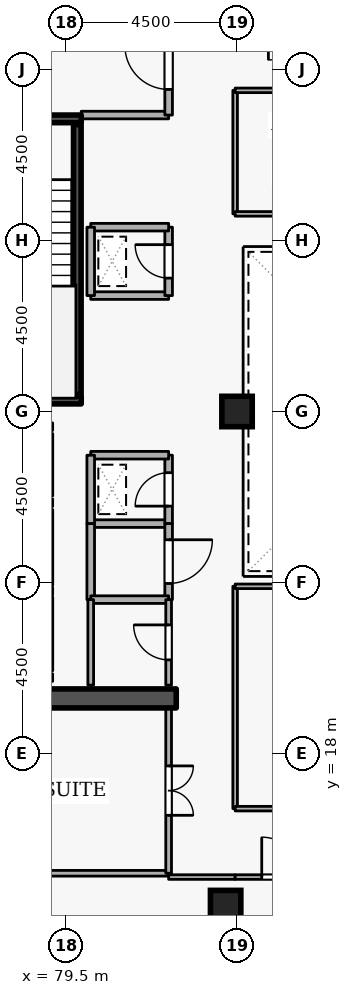
"""IFC4 building model, lengths in metres.
Left out: names, types, materials, properties, quantities, classifications, styles, units other than length and angle.
Written with IfcOpenShell. Run it as: python <this file> out.ifc"""

import sys

from ifc_helpers import new_model, si_unit, direction, frame, frame_2d, origin, origin_2d, place, context, subcontext, project, spatial, rectangle, extrude, element, fill, save


model = new_model("IFC4")
c1 = context("Model", 3, precision=1e-05, world=origin(), true_north=direction((0.0, 1.0)))
c2 = subcontext(c1, "Body", "Model", "MODEL_VIEW")
j1 = project(units=[si_unit("LENGTHUNIT", "METRE"), si_unit("PLANEANGLEUNIT", "RADIAN")], contexts=[c1])
p1 = place(None, origin())
s1 = spatial("IfcSite", under=j1, at=p1, CompositionType="ELEMENT")
p2 = place(p1, origin())
s2 = spatial("IfcBuilding", under=s1, at=p2, CompositionType="ELEMENT")
p3 = place(p2, frame((0.0, 0.0, 258.3)))
s3 = spatial("IfcBuildingStorey", under=s2, at=p3, CompositionType="ELEMENT", Elevation=258.3)
p4 = place(p3, frame((76.6, 19.45, 0.0), z_axis=(0.0, 0.0, 1.0), x_axis=(1.0, 0.0, 0.0)))
e1 = element("IfcWall", 1, at=p4, inside=s3, PredefinedType="SHEAR", context=c2, shape_type="SweptSolid", body=[
    extrude(rectangle(XDim=5.8, YDim=0.5, at=frame_2d((2.9, 0.0))), origin(), (0.0, 0.0, 1.0), 3.6),
])
for number, where, z_axis, x_axis in (
    (2, (83.7, 14.0, 0.0), (0.0, 0.0, 1.0), (1.0, 0.0, 0.0)),
    (3, (84.0, 27.0, 0.0), (0.0, 0.0, 1.0), (1.0, 0.0, 0.0)),
):
    element("IfcColumn", number, at=place(p3, frame(where, z_axis=z_axis, x_axis=x_axis)), inside=s3, PredefinedType="COLUMN", context=c2, shape_type="SweptSolid", body=[
        extrude(rectangle(XDim=0.8, YDim=0.8, at=origin_2d()), origin(), (0.0, 0.0, 1.0), 3.6),
    ])
p5 = place(p3, frame((79.05, 24.78, 0.0), z_axis=(0.0, 0.0, 1.0), x_axis=(0.0, 1.0, 0.0)))
e4 = element("IfcWall", 4, at=p5, inside=s3, PredefinedType="STANDARD", context=c2, shape_type="SweptSolid", body=[
    extrude(rectangle(XDim=1.64, YDim=0.2, at=frame_2d((0.82, 0.0))), origin(), (0.0, 0.0, 1.0), 3.34),
])
p6 = place(p5, frame((0.31, 0.0, 0.0)))
e5 = element("IfcOpeningElement", 5, at=p6, cuts=e4, PredefinedType="OPENING", context=c2, shape_type="SweptSolid", body=[
    extrude(rectangle(XDim=1.02, YDim=2.06, at=frame_2d((0.51, 1.03))), frame((0.0, 0.11, 0.0), z_axis=(0.0, -1.0, 0.0), x_axis=(1.0, 0.0, 0.0)), (0.0, 0.0, 1.0), 0.22),
])
p7 = place(p3, frame((79.05, 22.43, 0.0), z_axis=(0.0, 0.0, 1.0), x_axis=(0.0, 1.0, 0.0)))
e6 = element("IfcWall", 6, at=p7, inside=s3, PredefinedType="STANDARD", context=c2, shape_type="SweptSolid", body=[
    extrude(rectangle(XDim=1.99, YDim=0.2, at=frame_2d((0.995, 0.0))), origin(), (0.0, 0.0, 1.0), 3.34),
])
p8 = place(p7, frame((0.485, 0.0, 0.0)))
e7 = element("IfcOpeningElement", 7, at=p8, cuts=e6, PredefinedType="OPENING", context=c2, shape_type="SweptSolid", body=[
    extrude(rectangle(XDim=1.02, YDim=2.06, at=frame_2d((0.51, 1.03))), frame((0.0, 0.11, 0.0), z_axis=(0.0, -1.0, 0.0), x_axis=(1.0, 0.0, 0.0)), (0.0, 0.0, 1.0), 0.22),
])
p9 = place(p3, frame((79.05, 20.18, 0.0), z_axis=(0.0, 0.0, 1.0), x_axis=(0.0, 1.0, 0.0)))
e8 = element("IfcWall", 8, at=p9, inside=s3, PredefinedType="STANDARD", context=c2, shape_type="SweptSolid", body=[
    extrude(rectangle(XDim=1.94, YDim=0.2, at=frame_2d((0.97, 0.0))), origin(), (0.0, 0.0, 1.0), 3.34),
])
p10 = place(p9, frame((0.46, 0.0, 0.0)))
e9 = element("IfcOpeningElement", 9, at=p10, cuts=e8, PredefinedType="OPENING", context=c2, shape_type="SweptSolid", body=[
    extrude(rectangle(XDim=1.02, YDim=2.06, at=frame_2d((0.51, 1.03))), frame((0.0, 0.11, 0.0), z_axis=(0.0, -1.0, 0.0), x_axis=(1.0, 0.0, 0.0)), (0.0, 0.0, 1.0), 0.22),
])
p11 = place(p3, frame((76.55, 34.7, 0.0), z_axis=(0.0, 0.0, 1.0), x_axis=(1.0, 0.0, 0.0)))
e10 = element("IfcWall", 10, at=p11, inside=s3, PredefinedType="SHEAR", context=c2, shape_type="SweptSolid", body=[
    extrude(rectangle(XDim=3.35, YDim=0.2, at=frame_2d((1.675, 0.0))), origin(), (0.0, 0.0, 1.0), 3.6),
])
p12 = place(p11, frame((1.125, 0.0, 0.0)))
e11 = element("IfcOpeningElement", 11, at=p12, cuts=e10, PredefinedType="OPENING", context=c2, shape_type="SweptSolid", body=[
    extrude(rectangle(XDim=1.1, YDim=2.1, at=frame_2d((0.55, 1.05))), frame((0.0, 0.11, 0.0), z_axis=(0.0, -1.0, 0.0), x_axis=(1.0, 0.0, 0.0)), (0.0, 0.0, 1.0), 0.22),
])
p13 = place(p3, frame((79.9, 27.3, 0.0), z_axis=(0.0, 0.0, 1.0), x_axis=(-1.0, 0.0, 0.0)))
e12 = element("IfcWall", 12, at=p13, inside=s3, PredefinedType="SHEAR", context=c2, shape_type="SweptSolid", body=[
    extrude(rectangle(XDim=3.35, YDim=0.2, at=frame_2d((1.675, 0.0))), origin(), (0.0, 0.0, 1.0), 3.6),
])
p14 = place(p3, frame((79.797, 27.45, 0.0), z_axis=(0.0, 0.0, 1.0), x_axis=(0.0, 1.0, 0.0)))
e13 = element("IfcWall", 13, at=p14, inside=s3, PredefinedType="SHEAR", context=c2, shape_type="SweptSolid", body=[
    extrude(rectangle(XDim=7.1, YDim=0.2, at=frame_2d((3.55, 0.0))), origin(), (0.0, 0.0, 1.0), 3.6),
])
p15 = place(p3, frame((79.9, 34.8, 0.0), z_axis=(0.0, 0.0, 1.0), x_axis=(1.0, 0.0, 0.0)))
e14 = element("IfcWall", 14, at=p15, inside=s3, PredefinedType="STANDARD", context=c2, shape_type="SweptSolid", body=[
    extrude(rectangle(XDim=2.3, YDim=0.2, at=frame_2d((1.15, 0.0))), origin(), (0.0, 0.0, 1.0), 2.545),
])
p16 = place(p3, frame((82.2, 34.8, 0.0), z_axis=(0.0, 0.0, 1.0), x_axis=(0.0, 1.0, 0.0)))
e15 = element("IfcWall", 15, at=p16, inside=s3, PredefinedType="STANDARD", context=c2, shape_type="SweptSolid", body=[
    extrude(rectangle(XDim=2.5, YDim=0.2, at=frame_2d((1.25, 0.0))), origin(), (0.0, 0.0, 1.0), 3.34),
])
p17 = place(p16, frame((0.675, 0.0, 0.0)))
e16 = element("IfcOpeningElement", 16, at=p17, cuts=e15, PredefinedType="OPENING", context=c2, shape_type="SweptSolid", body=[
    extrude(rectangle(XDim=1.15, YDim=2.1, at=frame_2d((0.575, 1.05))), frame((0.0, 0.11, 0.0), z_axis=(0.0, -1.0, 0.0), x_axis=(1.0, 0.0, 0.0)), (0.0, 0.0, 1.0), 0.22),
])
p18 = place(p3, frame((80.15, 24.05, 0.0), z_axis=(0.0, 0.0, 1.0), x_axis=(1.0, 0.0, 0.0)))
e17 = element("IfcWall", 17, at=p18, inside=s3, PredefinedType="STANDARD", context=c2, shape_type="SweptSolid", body=[
    extrude(rectangle(XDim=2.05, YDim=0.2, at=frame_2d((1.025, 0.0))), origin(), (0.0, 0.0, 1.0), 3.34),
])
p19 = place(p3, frame((82.2, 24.05, 0.0), z_axis=(0.0, 0.0, 1.0), x_axis=(0.0, 1.0, 0.0)))
e18 = element("IfcWall", 18, at=p19, inside=s3, PredefinedType="STANDARD", context=c2, shape_type="SweptSolid", body=[
    extrude(rectangle(XDim=1.8, YDim=0.2, at=frame_2d((0.9, 0.0))), origin(), (0.0, 0.0, 1.0), 3.34),
])
p20 = place(p19, frame((0.46, 0.0, 0.0)))
e19 = element("IfcOpeningElement", 19, at=p20, cuts=e18, PredefinedType="OPENING", context=c2, shape_type="SweptSolid", body=[
    extrude(rectangle(XDim=0.88, YDim=2.04, at=frame_2d((0.44, 1.02))), frame((0.0, 0.11, 0.0), z_axis=(0.0, -1.0, 0.0), x_axis=(1.0, 0.0, 0.0)), (0.0, 0.0, 1.0), 0.22),
])
p21 = place(p3, frame((82.2, 25.85, 0.0), z_axis=(0.0, 0.0, 1.0), x_axis=(-1.0, 0.0, 0.0)))
e20 = element("IfcWall", 20, at=p21, inside=s3, PredefinedType="STANDARD", context=c2, shape_type="SweptSolid", body=[
    extrude(rectangle(XDim=2.05, YDim=0.2, at=frame_2d((1.025, 0.0))), origin(), (0.0, 0.0, 1.0), 3.34),
])
p22 = place(p3, frame((80.15, 25.85, 0.0), z_axis=(0.0, 0.0, 1.0), x_axis=(0.0, -1.0, 0.0)))
e21 = element("IfcWall", 21, at=p22, inside=s3, PredefinedType="STANDARD", context=c2, shape_type="SweptSolid", body=[
    extrude(rectangle(XDim=1.8, YDim=0.2, at=frame_2d((0.9, 0.0))), origin(), (0.0, 0.0, 1.0), 3.34),
])
p23 = place(p3, frame((80.15, 30.05, 0.0), z_axis=(0.0, 0.0, 1.0), x_axis=(1.0, 0.0, 0.0)))
e22 = element("IfcWall", 22, at=p23, inside=s3, PredefinedType="STANDARD", context=c2, shape_type="SweptSolid", body=[
    extrude(rectangle(XDim=2.05, YDim=0.2, at=frame_2d((1.025, 0.0))), origin(), (0.0, 0.0, 1.0), 3.34),
])
p24 = place(p3, frame((82.2, 30.05, 0.0), z_axis=(0.0, 0.0, 1.0), x_axis=(0.0, 1.0, 0.0)))
e23 = element("IfcWall", 23, at=p24, inside=s3, PredefinedType="STANDARD", context=c2, shape_type="SweptSolid", body=[
    extrude(rectangle(XDim=1.8, YDim=0.2, at=frame_2d((0.9, 0.0))), origin(), (0.0, 0.0, 1.0), 3.34),
])
p25 = place(p24, frame((0.46, 0.0, 0.0)))
e24 = element("IfcOpeningElement", 24, at=p25, cuts=e23, PredefinedType="OPENING", context=c2, shape_type="SweptSolid", body=[
    extrude(rectangle(XDim=0.88, YDim=2.04, at=frame_2d((0.44, 1.02))), frame((0.0, 0.11, 0.0), z_axis=(0.0, -1.0, 0.0), x_axis=(1.0, 0.0, 0.0)), (0.0, 0.0, 1.0), 0.22),
])
p26 = place(p3, frame((82.2, 31.85, 0.0), z_axis=(0.0, 0.0, 1.0), x_axis=(-1.0, 0.0, 0.0)))
e25 = element("IfcWall", 25, at=p26, inside=s3, PredefinedType="STANDARD", context=c2, shape_type="SweptSolid", body=[
    extrude(rectangle(XDim=2.05, YDim=0.2, at=frame_2d((1.025, 0.0))), origin(), (0.0, 0.0, 1.0), 3.34),
])
p27 = place(p3, frame((80.15, 31.85, 0.0), z_axis=(0.0, 0.0, 1.0), x_axis=(0.0, -1.0, 0.0)))
e26 = element("IfcWall", 26, at=p27, inside=s3, PredefinedType="STANDARD", context=c2, shape_type="SweptSolid", body=[
    extrude(rectangle(XDim=1.8, YDim=0.2, at=frame_2d((0.9, 0.0))), origin(), (0.0, 0.0, 1.0), 3.34),
])
p28 = place(p3, frame((80.15, 22.05, 0.0), z_axis=(0.0, 0.0, 1.0), x_axis=(0.0, 1.0, 0.0)))
e27 = element("IfcWall", 27, at=p28, inside=s3, PredefinedType="STANDARD", context=c2, shape_type="SweptSolid", body=[
    extrude(rectangle(XDim=2.0, YDim=0.2, at=frame_2d((1.0, 0.0))), origin(), (0.0, 0.0, 1.0), 3.34),
])
p29 = place(p3, frame((82.2, 24.05, 0.0), z_axis=(0.0, 0.0, 1.0), x_axis=(0.0, -1.0, 0.0)))
e28 = element("IfcWall", 28, at=p29, inside=s3, PredefinedType="STANDARD", context=c2, shape_type="SweptSolid", body=[
    extrude(rectangle(XDim=2.0, YDim=0.2, at=frame_2d((1.0, 0.0))), origin(), (0.0, 0.0, 1.0), 3.34),
])
p30 = place(p29, frame((0.425, 0.0, 0.0)))
e29 = element("IfcOpeningElement", 29, at=p30, cuts=e28, PredefinedType="OPENING", context=c2, shape_type="SweptSolid", body=[
    extrude(rectangle(XDim=1.15, YDim=2.1, at=frame_2d((0.575, 1.05))), frame((0.0, 0.11, 0.0), z_axis=(0.0, -1.0, 0.0), x_axis=(1.0, 0.0, 0.0)), (0.0, 0.0, 1.0), 0.22),
])
p31 = place(p3, frame((82.2, 22.05, 0.0), z_axis=(0.0, 0.0, 1.0), x_axis=(-1.0, 0.0, 0.0)))
e30 = element("IfcWall", 30, at=p31, inside=s3, PredefinedType="STANDARD", context=c2, shape_type="SweptSolid", body=[
    extrude(rectangle(XDim=2.05, YDim=0.2, at=frame_2d((1.025, 0.0))), origin(), (0.0, 0.0, 1.0), 3.34),
])
p32 = place(p3, frame((82.2, 19.8, 0.0), z_axis=(0.0, 0.0, 1.0), x_axis=(0.0, 1.0, 0.0)))
e31 = element("IfcWall", 31, at=p32, inside=s3, PredefinedType="PARTITIONING", context=c2, shape_type="SweptSolid", body=[
    extrude(rectangle(XDim=2.25, YDim=0.15, at=frame_2d((1.125, 0.0))), origin(), (0.0, 0.0, 1.0), 3.34),
])
p33 = place(p32, frame((0.665, 0.0, 0.0)))
e32 = element("IfcOpeningElement", 32, at=p33, cuts=e31, PredefinedType="OPENING", context=c2, shape_type="SweptSolid", body=[
    extrude(rectangle(XDim=0.92, YDim=2.08, at=frame_2d((0.46, 1.04))), frame((0.0, 0.085, 0.0), z_axis=(0.0, -1.0, 0.0), x_axis=(1.0, 0.0, 0.0)), (0.0, 0.0, 1.0), 0.17),
])
p34 = place(p3, frame((80.15, 22.05, 0.0), z_axis=(0.0, 0.0, 1.0), x_axis=(0.0, -1.0, 0.0)))
e33 = element("IfcWall", 33, at=p34, inside=s3, PredefinedType="PARTITIONING", context=c2, shape_type="SweptSolid", body=[
    extrude(rectangle(XDim=2.25, YDim=0.15, at=frame_2d((1.125, 0.0))), origin(), (0.0, 0.0, 1.0), 3.34),
])
p35 = place(p3, frame((82.2, 14.85, 0.0), z_axis=(0.0, 0.0, 1.0), x_axis=(-1.0, 0.0, 0.0)))
e34 = element("IfcWall", 34, at=p35, inside=s3, PredefinedType="PARTITIONING", context=c2, shape_type="SweptSolid", body=[
    extrude(rectangle(XDim=11.42, YDim=0.15, at=frame_2d((5.71, 0.0))), origin(), (0.0, 0.0, 1.0), 3.34),
])
p36 = place(p3, frame((82.2, 19.2, 0.0), z_axis=(0.0, 0.0, 1.0), x_axis=(0.0, -1.0, 0.0)))
e35 = element("IfcWall", 35, at=p36, inside=s3, PredefinedType="PARTITIONING", context=c2, shape_type="SweptSolid", body=[
    extrude(rectangle(XDim=4.35, YDim=0.15, at=frame_2d((2.175, 0.0))), origin(), (0.0, 0.0, 1.0), 3.34),
])
p37 = place(p36, frame((1.525, 0.0, 0.0)))
e36 = element("IfcOpeningElement", 36, at=p37, cuts=e35, PredefinedType="OPENING", context=c2, shape_type="SweptSolid", body=[
    extrude(rectangle(XDim=1.3, YDim=2.12, at=frame_2d((0.65, 1.06))), frame((0.0, 0.085, 0.0), z_axis=(0.0, -1.0, 0.0), x_axis=(1.0, 0.0, 0.0)), (0.0, 0.0, 1.0), 0.17),
])
p38 = place(p3, frame((82.2, 14.75, 0.0), z_axis=(0.0, 0.0, 1.0), x_axis=(1.0, 0.0, 0.0)))
e37 = element("IfcWall", 37, at=p38, inside=s3, PredefinedType="PARTITIONING", context=c2, shape_type="SweptSolid", body=[
    extrude(rectangle(XDim=1.75, YDim=0.12, at=frame_2d((0.875, 0.0))), origin(), (0.0, 0.0, 1.0), 3.34),
])
p39 = place(p3, frame((83.95, 14.75, 0.0), z_axis=(0.0, 0.0, 1.0), x_axis=(1.0, 0.0, 0.0)))
e38 = element("IfcWall", 38, at=p39, inside=s3, PredefinedType="PARTITIONING", context=c2, shape_type="SweptSolid", body=[
    extrude(rectangle(XDim=2.45, YDim=0.12, at=frame_2d((1.225, 0.0))), origin(), (0.0, 0.0, 1.0), 3.34),
])
p40 = place(p39, frame((0.7, 0.0, 0.0)))
e39 = element("IfcOpeningElement", 39, at=p40, cuts=e38, PredefinedType="OPENING", context=c2, shape_type="SweptSolid", body=[
    extrude(rectangle(XDim=1.05, YDim=2.1, at=frame_2d((0.525, 1.05))), frame((0.0, 0.07, 0.0), z_axis=(0.0, -1.0, 0.0), x_axis=(1.0, 0.0, 0.0)), (0.0, 0.0, 1.0), 0.14),
])
p41 = place(p3, frame((83.95, 16.55, 0.0), z_axis=(0.0, 0.0, 1.0), x_axis=(0.0, 1.0, 0.0)))
e40 = element("IfcWall", 40, at=p41, inside=s3, PredefinedType="PARTITIONING", context=c2, shape_type="SweptSolid", body=[
    extrude(rectangle(XDim=5.85, YDim=0.12, at=frame_2d((2.925, 0.0))), origin(), (0.0, 0.0, 1.0), 3.34),
])
p42 = place(p3, frame((83.95, 22.4, 0.0), z_axis=(0.0, 0.0, 1.0), x_axis=(1.0, 0.0, 0.0)))
e41 = element("IfcWall", 41, at=p42, inside=s3, PredefinedType="PARTITIONING", context=c2, shape_type="SweptSolid", body=[
    extrude(rectangle(XDim=9.1, YDim=0.12, at=frame_2d((4.55, 0.0))), origin(), (0.0, 0.0, 1.0), 3.34),
])
p43 = place(p3, frame((93.05, 16.55, 0.0), z_axis=(0.0, 0.0, 1.0), x_axis=(-1.0, 0.0, 0.0)))
e42 = element("IfcWall", 42, at=p43, inside=s3, PredefinedType="PARTITIONING", context=c2, shape_type="SweptSolid", body=[
    extrude(rectangle(XDim=9.1, YDim=0.12, at=frame_2d((4.55, 0.0))), origin(), (0.0, 0.0, 1.0), 3.34),
])
p44 = place(p43, frame((4.075, 0.0, 0.0)))
e43 = element("IfcOpeningElement", 43, at=p44, cuts=e42, PredefinedType="OPENING", context=c2, shape_type="SweptSolid", body=[
    extrude(rectangle(XDim=0.95, YDim=2.1, at=frame_2d((0.475, 1.05))), frame((0.0, 0.07, 0.0), z_axis=(0.0, -1.0, 0.0), x_axis=(1.0, 0.0, 0.0)), (0.0, 0.0, 1.0), 0.14),
])
p45 = place(p3, frame((83.95, 32.2, 0.0), z_axis=(0.0, 0.0, 1.0), x_axis=(0.0, 1.0, 0.0)))
e44 = element("IfcWall", 44, at=p45, inside=s3, PredefinedType="PARTITIONING", context=c2, shape_type="SweptSolid", body=[
    extrude(rectangle(XDim=3.25, YDim=0.12, at=frame_2d((1.625, 0.0))), origin(), (0.0, 0.0, 1.0), 3.34),
])
p46 = place(p3, frame((83.95, 35.45, 0.0), z_axis=(0.0, 0.0, 1.0), x_axis=(1.0, 0.0, 0.0)))
e45 = element("IfcWall", 45, at=p46, inside=s3, PredefinedType="PARTITIONING", context=c2, shape_type="SweptSolid", body=[
    extrude(rectangle(XDim=9.1, YDim=0.12, at=frame_2d((4.55, 0.0))), origin(), (0.0, 0.0, 1.0), 3.34),
])
p47 = place(p46, frame((4.075, 0.0, 0.0)))
e46 = element("IfcOpeningElement", 46, at=p47, cuts=e45, PredefinedType="OPENING", context=c2, shape_type="SweptSolid", body=[
    extrude(rectangle(XDim=0.95, YDim=2.1, at=frame_2d((0.475, 1.05))), frame((0.0, 0.07, 0.0), z_axis=(0.0, -1.0, 0.0), x_axis=(1.0, 0.0, 0.0)), (0.0, 0.0, 1.0), 0.14),
])
p48 = place(p3, frame((93.05, 32.2, 0.0), z_axis=(0.0, 0.0, 1.0), x_axis=(-1.0, 0.0, 0.0)))
e47 = element("IfcWall", 47, at=p48, inside=s3, PredefinedType="PARTITIONING", context=c2, shape_type="SweptSolid", body=[
    extrude(rectangle(XDim=9.1, YDim=0.12, at=frame_2d((4.55, 0.0))), origin(), (0.0, 0.0, 1.0), 3.34),
])
p49 = place(p17, origin())
e48 = element("IfcDoor", 48, at=p49, inside=s3, OperationType="SINGLE_SWING_RIGHT", PredefinedType="DOOR", context=c2, shape_type="SweptSolid", body=[
    extrude(rectangle(XDim=1.15, YDim=2.1, at=frame_2d((0.575, 1.05))), frame((0.0, 0.025, 0.0), z_axis=(0.0, -1.0, 0.0), x_axis=(1.0, 0.0, 0.0)), (0.0, 0.0, 1.0), 0.05),
])
fill(e16, e48)
p50 = place(p20, origin())
e49 = element("IfcDoor", 49, at=p50, inside=s3, OperationType="SINGLE_SWING_LEFT", PredefinedType="DOOR", context=c2, shape_type="SweptSolid", body=[
    extrude(rectangle(XDim=0.88, YDim=2.04, at=frame_2d((0.44, 1.02))), frame((0.0, 0.025, 0.0), z_axis=(0.0, -1.0, 0.0), x_axis=(1.0, 0.0, 0.0)), (0.0, 0.0, 1.0), 0.05),
])
fill(e19, e49)
p51 = place(p25, origin())
e50 = element("IfcDoor", 50, at=p51, inside=s3, OperationType="SINGLE_SWING_RIGHT", PredefinedType="DOOR", context=c2, shape_type="SweptSolid", body=[
    extrude(rectangle(XDim=0.88, YDim=2.04, at=frame_2d((0.44, 1.02))), frame((0.0, 0.025, 0.0), z_axis=(0.0, -1.0, 0.0), x_axis=(1.0, 0.0, 0.0)), (0.0, 0.0, 1.0), 0.05),
])
fill(e24, e50)
p52 = place(p33, origin())
e51 = element("IfcDoor", 51, at=p52, inside=s3, OperationType="SINGLE_SWING_RIGHT", PredefinedType="DOOR", context=c2, shape_type="SweptSolid", body=[
    extrude(rectangle(XDim=0.92, YDim=2.08, at=frame_2d((0.46, 1.04))), frame((0.0, 0.025, 0.0), z_axis=(0.0, -1.0, 0.0), x_axis=(1.0, 0.0, 0.0)), (0.0, 0.0, 1.0), 0.05),
])
fill(e32, e51)
p53 = place(p30, origin())
e52 = element("IfcDoor", 52, at=p53, inside=s3, OperationType="SINGLE_SWING_LEFT", PredefinedType="DOOR", context=c2, shape_type="SweptSolid", body=[
    extrude(rectangle(XDim=1.15, YDim=2.1, at=frame_2d((0.575, 1.05))), frame((0.0, 0.025, 0.0), z_axis=(0.0, -1.0, 0.0), x_axis=(1.0, 0.0, 0.0)), (0.0, 0.0, 1.0), 0.05),
])
fill(e29, e52)
p54 = place(p37, origin())
e53 = element("IfcDoor", 53, at=p54, inside=s3, OperationType="DOUBLE_DOOR_SINGLE_SWING", PredefinedType="DOOR", context=c2, shape_type="SweptSolid", body=[
    extrude(rectangle(XDim=1.3, YDim=2.12, at=frame_2d((0.65, 1.06))), frame((0.0, 0.025, 0.0), z_axis=(0.0, -1.0, 0.0), x_axis=(1.0, 0.0, 0.0)), (0.0, 0.0, 1.0), 0.05),
])
fill(e36, e53)
p55 = place(p40, origin())
e54 = element("IfcDoor", 54, at=p55, inside=s3, OperationType="SINGLE_SWING_LEFT", PredefinedType="DOOR", context=c2, shape_type="SweptSolid", body=[
    extrude(rectangle(XDim=1.05, YDim=2.1, at=frame_2d((0.525, 1.05))), frame((0.0, 0.025, 0.0), z_axis=(0.0, -1.0, 0.0), x_axis=(1.0, 0.0, 0.0)), (0.0, 0.0, 1.0), 0.05),
])
fill(e39, e54)
save(model, sys.argv[1])
